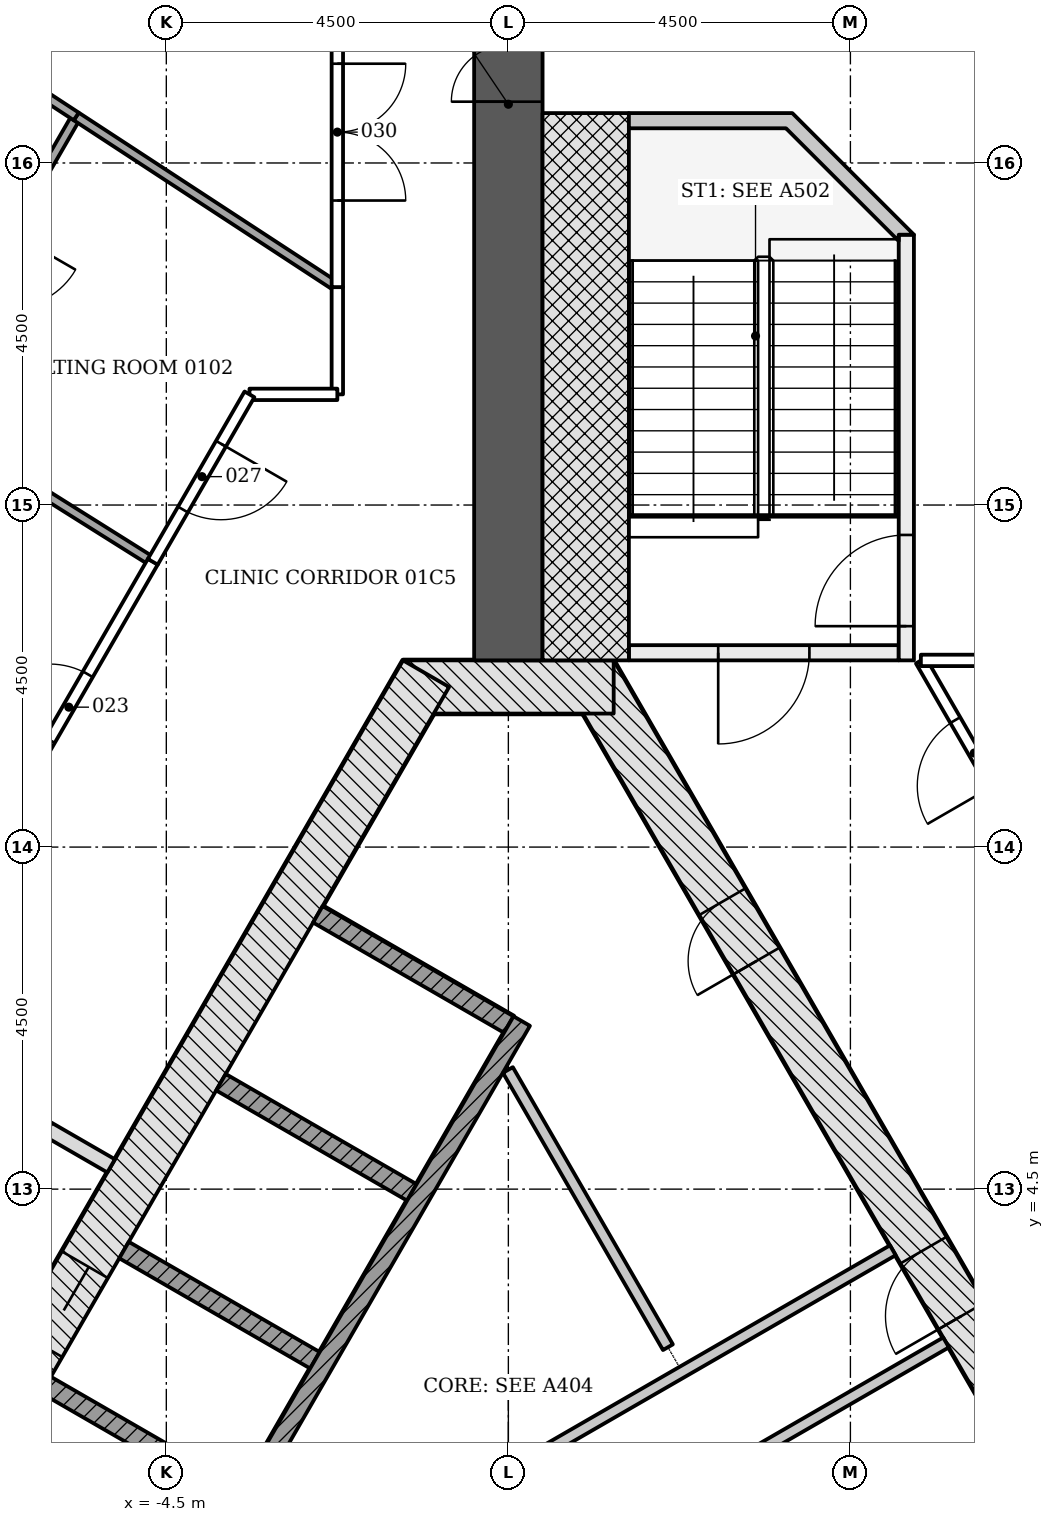
"""IFC4 building model, lengths in metres.
Left out: names, types, materials, properties, quantities, classifications, styles, units other than length and angle.
Written with IfcOpenShell. Run it as: python <this file> out.ifc"""

import sys

from ifc_helpers import new_model, si_unit, direction, frame, frame_2d, origin, place, context, subcontext, project, spatial, polyline, rectangle, outline, extrude, element, fill, save


model = new_model("IFC4")
c1 = context("Model", 3, precision=1e-05, world=origin(), true_north=direction((0.0, 1.0)))
c2 = subcontext(c1, "Body", "Model", "MODEL_VIEW")
j1 = project(units=[si_unit("LENGTHUNIT", "METRE"), si_unit("PLANEANGLEUNIT", "RADIAN")], contexts=[c1])
p1 = place(None, origin())
s1 = spatial("IfcSite", under=j1, at=p1, CompositionType="ELEMENT")
p2 = place(p1, origin())
s2 = spatial("IfcBuilding", under=s1, at=p2, CompositionType="ELEMENT")
p3 = place(p2, frame((0.0, 0.0, 6.0)))
s3 = spatial("IfcBuildingStorey", under=s2, at=p3, CompositionType="ELEMENT", Elevation=6.0)
p4 = place(p3, frame((10.311, -4.703, -0.25), z_axis=(0.0, 0.0, 1.0), x_axis=(-0.500001446645, 0.866024568562, 0.0)))
e1 = element("IfcWall", 1, at=p4, inside=s3, PredefinedType="SHEAR", context=c2, shape_type="SweptSolid", body=[
    extrude(rectangle(XDim=18.458, YDim=0.7, at=frame_2d((9.229, 0.0))), origin(), (0.0, 0.0, 1.0), 4.5),
])
p5 = place(p4, frame((8.7, 0.0, 0.25)))
e2 = element("IfcOpeningElement", 2, at=p5, cuts=e1, PredefinedType="OPENING", context=c2, shape_type="SweptSolid", body=[
    extrude(rectangle(XDim=1.0, YDim=2.1, at=frame_2d((0.5, 1.05))), frame((0.0, 0.36, 0.0), z_axis=(0.0, -1.0, 0.0), x_axis=(1.0, 0.0, 0.0)), (0.0, 0.0, 1.0), 0.72),
])
p6 = place(p4, frame((4.002, 0.0, 0.25)))
e3 = element("IfcOpeningElement", 3, at=p6, cuts=e1, PredefinedType="OPENING", context=c2, shape_type="SweptSolid", body=[
    extrude(rectangle(XDim=0.9, YDim=2.1, at=frame_2d((0.45, 1.05))), frame((0.0, 0.36, 0.0), z_axis=(0.0, -1.0, 0.0), x_axis=(1.0, 0.0, 0.0)), (0.0, 0.0, 1.0), 0.72),
])
p7 = place(p4, frame((14.093, 0.0, 0.25)))
e4 = element("IfcOpeningElement", 4, at=p7, cuts=e1, PredefinedType="OPENING", context=c2, shape_type="SweptSolid", body=[
    extrude(rectangle(XDim=0.9, YDim=2.1, at=frame_2d((0.45, 1.05))), frame((0.0, 0.36, 0.0), z_axis=(0.0, -1.0, 0.0), x_axis=(1.0, 0.0, 0.0)), (0.0, 0.0, 1.0), 0.72),
])
p8 = place(p3, frame((1.386, 11.106, -0.25), z_axis=(0.0, 0.0, 1.0), x_axis=(-1.0, 0.0, 0.0)))
e5 = element("IfcWall", 5, at=p8, inside=s3, PredefinedType="SHEAR", context=c2, shape_type="SweptSolid", body=[
    extrude(rectangle(XDim=2.771, YDim=0.7, at=frame_2d((1.386, 0.0))), origin(), (0.0, 0.0, 1.0), 4.5),
])
p9 = place(p3, frame((-1.083, 11.281, -0.25), z_axis=(0.0, 0.0, 1.0), x_axis=(-0.500001446645, -0.866024568562, 0.0)))
e6 = element("IfcWall", 6, at=p9, inside=s3, PredefinedType="SHEAR", context=c2, shape_type="SweptSolid", body=[
    extrude(rectangle(XDim=18.458, YDim=0.7, at=frame_2d((9.229, 0.0))), origin(), (0.0, 0.0, 1.0), 4.5),
])
p10 = place(p9, frame((8.979, 0.0, 0.25)))
e7 = element("IfcOpeningElement", 7, at=p10, cuts=e6, PredefinedType="OPENING", context=c2, shape_type="SweptSolid", body=[
    extrude(rectangle(XDim=1.2, YDim=2.1, at=frame_2d((0.6, 1.05))), frame((0.0, 0.36, 0.0), z_axis=(0.0, -1.0, 0.0), x_axis=(1.0, 0.0, 0.0)), (0.0, 0.0, 1.0), 0.72),
])
p11 = place(p9, frame((11.029, 0.0, 0.25)))
e8 = element("IfcOpeningElement", 8, at=p11, cuts=e6, PredefinedType="OPENING", context=c2, shape_type="SweptSolid", body=[
    extrude(rectangle(XDim=1.2, YDim=2.1, at=frame_2d((0.6, 1.05))), frame((0.0, 0.36, 0.0), z_axis=(0.0, -1.0, 0.0), x_axis=(1.0, 0.0, 0.0)), (0.0, 0.0, 1.0), 0.72),
])
p12 = place(p3, frame((0.0, 11.456, -0.25), z_axis=(0.0, 0.0, 1.0), x_axis=(0.0, 1.0, 0.0)))
e9 = element("IfcWall", 9, at=p12, inside=s3, PredefinedType="SHEAR", context=c2, shape_type="SweptSolid", body=[
    extrude(rectangle(XDim=14.633, YDim=0.9, at=frame_2d((7.316, 0.0))), origin(), (0.0, 0.0, 1.0), 4.5),
])
p13 = place(p12, frame((7.35, 0.0, 0.25)))
e10 = element("IfcOpeningElement", 10, at=p13, cuts=e9, PredefinedType="OPENING", context=c2, shape_type="SweptSolid", body=[
    extrude(rectangle(XDim=1.5, YDim=2.1, at=frame_2d((0.75, 1.05))), frame((0.0, 0.46, 0.0), z_axis=(0.0, -1.0, 0.0), x_axis=(1.0, 0.0, 0.0)), (0.0, 0.0, 1.0), 0.92),
])
p14 = place(p3, frame((-2.506, 8.115, -0.25), z_axis=(0.0, 0.0, 1.0), x_axis=(0.865996321171, -0.50005036918, 0.0)))
e11 = element("IfcWall", 11, at=p14, inside=s3, PredefinedType="PARTITIONING", context=c2, shape_type="SweptSolid", body=[
    extrude(rectangle(XDim=2.9, YDim=0.25, at=frame_2d((1.45, 0.0))), origin(), (0.0, 0.0, 1.0), 4.5),
])
for number, where, z_axis, x_axis in (
    (12, (-3.781, 5.907, -0.25), (0.0, 0.0, 1.0), (0.866, -0.5, 0.0)),
    (13, (-5.056, 3.699, -0.25), (0.0, 0.0, 1.0), (0.866, -0.5, 0.0)),
    (14, (-6.081, 1.923, -0.25), (0.0, 0.0, 1.0), (0.866, -0.5, 0.0)),
):
    element("IfcWall", number, at=place(p3, frame(where, z_axis=z_axis, x_axis=x_axis)), inside=s3, PredefinedType="PARTITIONING", context=c2, shape_type="SweptSolid", body=[
        extrude(rectangle(XDim=2.9, YDim=0.25, at=frame_2d((1.45, 0.0))), origin(), (0.0, 0.0, 1.0), 4.5),
    ])
p15 = place(p3, frame((0.176, 6.711, 0.0), z_axis=(0.0, 0.0, 1.0), x_axis=(-0.500004227369, -0.866022963098, 0.0)))
e15 = element("IfcWall", 15, at=p15, inside=s3, PredefinedType="PARTITIONING", context=c2, shape_type="SweptSolid", body=[
    extrude(rectangle(XDim=11.8, YDim=0.25, at=frame_2d((5.9, 0.0))), origin(), (0.0, 0.0, 1.0), 4.25),
])
p16 = place(p3, frame((-4.548, -1.851, 0.0), z_axis=(0.0, 0.0, 1.0), x_axis=(0.866023939251, 0.500002536638, 0.0)))
e16 = element("IfcWall", 16, at=p16, inside=s3, PredefinedType="PARTITIONING", context=c2, shape_type="SweptSolid", body=[
    extrude(rectangle(XDim=11.092, YDim=0.15, at=frame_2d((5.546, 0.0))), origin(), (0.0, 0.0, 1.0), 4.25),
])
p17 = place(p16, frame((3.497, 0.0, 0.0)))
e17 = element("IfcOpeningElement", 17, at=p17, cuts=e16, PredefinedType="OPENING", context=c2, shape_type="SweptSolid", body=[
    extrude(rectangle(XDim=0.9, YDim=2.1, at=frame_2d((0.45, 1.05))), frame((0.0, 0.085, 0.0), z_axis=(0.0, -1.0, 0.0), x_axis=(1.0, 0.0, 0.0)), (0.0, 0.0, 1.0), 0.17),
])
p18 = place(p3, frame((2.099, 2.42, 0.0), z_axis=(0.0, 0.0, 1.0), x_axis=(-0.499998449073, 0.866026299211, 0.0)))
e18 = element("IfcWall", 18, at=p18, inside=s3, PredefinedType="PARTITIONING", context=c2, shape_type="SweptSolid", body=[
    extrude(rectangle(XDim=4.211, YDim=0.15, at=frame_2d((2.106, 0.0))), origin(), (0.0, 0.0, 1.0), 4.25),
])
p19 = place(p3, frame((-4.454, -3.413, 0.0), z_axis=(0.0, 0.0, 1.0), x_axis=(0.86603043987, 0.499991277142, 0.0)))
e19 = element("IfcWall", 19, at=p19, inside=s3, PredefinedType="PARTITIONING", context=c2, shape_type="SweptSolid", body=[
    extrude(rectangle(XDim=11.792, YDim=0.15, at=frame_2d((5.896, 0.0))), origin(), (0.0, 0.0, 1.0), 4.25),
])
p20 = place(p19, frame((3.847, 0.0, 0.0)))
e20 = element("IfcOpeningElement", 20, at=p20, cuts=e19, PredefinedType="OPENING", context=c2, shape_type="SweptSolid", body=[
    extrude(rectangle(XDim=0.9, YDim=2.1, at=frame_2d((0.45, 1.05))), frame((0.0, 0.085, 0.0), z_axis=(0.0, -1.0, 0.0), x_axis=(1.0, 0.0, 0.0)), (0.0, 0.0, 1.0), 0.17),
])
p21 = place(p3, frame((5.135, 11.556, -0.25), z_axis=(0.0, 0.0, 1.0), x_axis=(-1.0, 0.0, 0.0)))
e21 = element("IfcWall", 21, at=p21, inside=s3, PredefinedType="SHEAR", context=c2, shape_type="SweptSolid", body=[
    extrude(rectangle(XDim=3.55, YDim=0.2, at=frame_2d((1.775, 0.0))), origin(), (0.0, 0.0, 1.0), 4.5),
])
p22 = place(p21, frame((1.175, 0.0, 0.25)))
e22 = element("IfcOpeningElement", 22, at=p22, cuts=e21, PredefinedType="OPENING", context=c2, shape_type="SweptSolid", body=[
    extrude(rectangle(XDim=1.2, YDim=2.1, at=frame_2d((0.6, 1.05))), frame((0.0, 0.11, 0.0), z_axis=(0.0, -1.0, 0.0), x_axis=(1.0, 0.0, 0.0)), (0.0, 0.0, 1.0), 0.22),
])
p23 = place(p3, frame((5.236, 11.456, -0.25), z_axis=(0.0, 0.0, 1.0), x_axis=(0.0, 1.0, 0.0)))
e23 = element("IfcWall", 23, at=p23, inside=s3, PredefinedType="SHEAR", context=c2, shape_type="SweptSolid", body=[
    extrude(rectangle(XDim=5.6, YDim=0.2, at=frame_2d((2.8, 0.0))), origin(), (0.0, 0.0, 1.0), 4.5),
])
p24 = place(p23, frame((0.45, 0.0, 0.25)))
e24 = element("IfcOpeningElement", 24, at=p24, cuts=e23, PredefinedType="OPENING", context=c2, shape_type="SweptSolid", body=[
    extrude(rectangle(XDim=1.2, YDim=2.1, at=frame_2d((0.6, 1.05))), frame((0.0, 0.11, 0.0), z_axis=(0.0, -1.0, 0.0), x_axis=(1.0, 0.0, 0.0)), (0.0, 0.0, 1.0), 0.22),
])
p25 = place(p3, frame((1.018, 11.456, -0.25), z_axis=(0.0, 0.0, 1.0), x_axis=(0.0, 1.0, 0.0)))
e25 = element("IfcWall", 25, at=p25, inside=s3, PredefinedType="SHEAR", context=c2, shape_type="SweptSolid", body=[
    extrude(rectangle(XDim=7.2, YDim=1.136, at=frame_2d((3.6, 0.0))), origin(), (0.0, 0.0, 1.0), 4.5),
])
p26 = place(p3, frame((0.0, 0.0, -0.25)))
e26 = element("IfcWall", 26, at=p26, inside=s3, PredefinedType="SHEAR", context=c2, shape_type="SweptSolid", body=[
    extrude(outline(polyline([(5.336, 17.056), (3.736, 18.656), (1.586, 18.656), (1.586, 18.456), (3.653, 18.456), (5.135, 16.974), (5.135, 17.056), (5.135, 17.056), (5.135, 17.056), (5.135, 17.056), (5.135, 17.056), (5.135, 17.056), (5.135, 17.056), (5.135, 17.056), (5.135, 17.056), (5.135, 17.056), (5.135, 17.056), (5.135, 17.056), (5.135, 17.056), (5.135, 17.056), (5.135, 17.056), (5.135, 17.056), (5.135, 17.056), (5.336, 17.056)])), origin(), (0.0, 0.0, 1.0), 4.5),
])
p27 = place(p3, frame((-5.226, 4.806, 0.0), z_axis=(0.0, 0.0, 1.0), x_axis=(-0.865949687125, 0.500131122175, 0.0)))
e27 = element("IfcWall", 27, at=p27, inside=s3, PredefinedType="PARTITIONING", context=c2, shape_type="SweptSolid", body=[
    extrude(rectangle(XDim=3.499, YDim=0.2, at=frame_2d((1.75, 0.0))), origin(), (0.0, 0.0, 1.0), 4.25),
])
p28 = place(p27, frame((0.95, 0.0, 0.0)))
e28 = element("IfcOpeningElement", 28, at=p28, cuts=e27, PredefinedType="OPENING", context=c2, shape_type="SweptSolid", body=[
    extrude(rectangle(XDim=1.5, YDim=2.1, at=frame_2d((0.75, 1.05))), frame((0.0, 0.11, 0.0), z_axis=(0.0, -1.0, 0.0), x_axis=(1.0, 0.0, 0.0)), (0.0, 0.0, 1.0), 0.22),
])
p29 = place(p3, frame((6.855, 8.982, 0.0), z_axis=(0.0, 0.0, 1.0), x_axis=(-0.500176439337, 0.865923512519, 0.0)))
e29 = element("IfcWall", 29, at=p29, inside=s3, PredefinedType="PARTITIONING", context=c2, shape_type="SweptSolid", body=[
    extrude(rectangle(XDim=2.855, YDim=0.15, at=frame_2d((1.427, 0.0))), origin(), (0.0, 0.0, 1.0), 3.638),
])
p30 = place(p29, frame((0.95, 0.0, 0.0)))
e30 = element("IfcOpeningElement", 30, at=p30, cuts=e29, PredefinedType="OPENING", context=c2, shape_type="SweptSolid", body=[
    extrude(rectangle(XDim=1.0, YDim=2.1, at=frame_2d((0.5, 1.05))), frame((0.0, 0.085, 0.0), z_axis=(0.0, -1.0, 0.0), x_axis=(1.0, 0.0, 0.0)), (0.0, 0.0, 1.0), 0.17),
])
p31 = place(p3, frame((5.427, 11.456, 0.0), z_axis=(0.0, 0.0, 1.0), x_axis=(1.0, 0.0, 0.0)))
e31 = element("IfcWall", 31, at=p31, inside=s3, PredefinedType="PARTITIONING", context=c2, shape_type="SweptSolid", body=[
    extrude(rectangle(XDim=1.708, YDim=0.15, at=frame_2d((0.854, 0.0))), origin(), (0.0, 0.0, 1.0), 4.25),
])
p32 = place(p3, frame((-6.858, 8.979, 0.0), z_axis=(0.0, 0.0, 1.0), x_axis=(0.500105111742, 0.865964708986, 0.0)))
e32 = element("IfcWall", 32, at=p32, inside=s3, PredefinedType="PARTITIONING", context=c2, shape_type="SweptSolid", body=[
    extrude(rectangle(XDim=4.363, YDim=0.15, at=frame_2d((2.181, 0.0))), origin(), (0.0, 0.0, 1.0), 3.638),
])
p33 = place(p32, frame((1.65, 0.0, 0.0)))
e33 = element("IfcOpeningElement", 33, at=p33, cuts=e32, PredefinedType="OPENING", context=c2, shape_type="SweptSolid", body=[
    extrude(rectangle(XDim=1.0, YDim=2.1, at=frame_2d((0.5, 1.05))), frame((0.0, 0.085, 0.0), z_axis=(0.0, -1.0, 0.0), x_axis=(1.0, 0.0, 0.0)), (0.0, 0.0, 1.0), 0.17),
])
p34 = place(p3, frame((-4.68, 12.753, 0.0), z_axis=(0.0, 0.0, 1.0), x_axis=(-0.846844902979, 0.531839929206, 0.0)))
e34 = element("IfcWall", 34, at=p34, inside=s3, PredefinedType="PARTITIONING", context=c2, shape_type="SweptSolid", body=[
    extrude(rectangle(XDim=3.8, YDim=0.12, at=frame_2d((1.9, 0.0))), origin(), (0.0, 0.0, 1.0), 3.638),
])
p35 = place(p3, frame((-2.25, 16.366, 0.0), z_axis=(0.0, 0.0, 1.0), x_axis=(0.0, -1.0, 0.0)))
e35 = element("IfcWall", 35, at=p35, inside=s3, PredefinedType="PARTITIONING", context=c2, shape_type="SweptSolid", body=[
    extrude(rectangle(XDim=1.41, YDim=0.15, at=frame_2d((0.705, 0.0))), origin(), (0.0, 0.0, 1.0), 3.638),
])
p36 = place(p3, frame((-2.25, 14.956, 0.0), z_axis=(0.0, 0.0, 1.0), x_axis=(-1.0, 0.0, 0.0)))
e36 = element("IfcWall", 36, at=p36, inside=s3, PredefinedType="PARTITIONING", context=c2, shape_type="SweptSolid", body=[
    extrude(rectangle(XDim=1.156, YDim=0.15, at=frame_2d((0.578, 0.0))), origin(), (0.0, 0.0, 1.0), 4.25),
])
p37 = place(p3, frame((-3.406, 14.956, 0.0), z_axis=(0.0, 0.0, 1.0), x_axis=(-0.499999364504, -0.866025770688, 0.0)))
e37 = element("IfcWall", 37, at=p37, inside=s3, PredefinedType="PARTITIONING", context=c2, shape_type="SweptSolid", body=[
    extrude(rectangle(XDim=2.544, YDim=0.15, at=frame_2d((1.272, 0.0))), origin(), (0.0, 0.0, 1.0), 3.638),
])
p38 = place(p37, frame((0.75, 0.0, 0.0)))
e38 = element("IfcOpeningElement", 38, at=p38, cuts=e37, PredefinedType="OPENING", context=c2, shape_type="SweptSolid", body=[
    extrude(rectangle(XDim=1.0, YDim=2.1, at=frame_2d((0.5, 1.05))), frame((0.0, 0.085, 0.0), z_axis=(0.0, -1.0, 0.0), x_axis=(1.0, 0.0, 0.0)), (0.0, 0.0, 1.0), 0.17),
])
p39 = place(p3, frame((-2.25, 20.456, 0.0), z_axis=(0.0, 0.0, 1.0), x_axis=(0.0, -1.0, 0.0)))
e39 = element("IfcWall", 39, at=p39, inside=s3, PredefinedType="PARTITIONING", context=c2, shape_type="SweptSolid", body=[
    extrude(rectangle(XDim=4.089, YDim=0.15, at=frame_2d((2.044, 0.0))), origin(), (0.0, 0.0, 1.0), 3.638),
])
p40 = place(p39, frame((1.15, 0.0, 0.0)))
e40 = element("IfcOpeningElement", 40, at=p40, cuts=e39, PredefinedType="OPENING", context=c2, shape_type="SweptSolid", body=[
    extrude(rectangle(XDim=1.8, YDim=2.1, at=frame_2d((0.9, 1.05))), frame((0.0, 0.085, 0.0), z_axis=(0.0, -1.0, 0.0), x_axis=(1.0, 0.0, 0.0)), (0.0, 0.0, 1.0), 0.17),
])
p41 = place(p3, frame((-5.684, 18.611, 0.0), z_axis=(0.0, 0.0, 1.0), x_axis=(-0.500099413844, -0.865967999567, 0.0)))
e41 = element("IfcWall", 41, at=p41, inside=s3, PredefinedType="PARTITIONING", context=c2, shape_type="SweptSolid", body=[
    extrude(rectangle(XDim=4.429, YDim=0.12, at=frame_2d((2.214, 0.0))), origin(), (0.0, 0.0, 1.0), 3.638),
])
p42 = place(p41, frame((1.75, 0.0, 0.0)))
e42 = element("IfcOpeningElement", 42, at=p42, cuts=e41, PredefinedType="OPENING", context=c2, shape_type="SweptSolid", body=[
    extrude(rectangle(XDim=1.0, YDim=2.1, at=frame_2d((0.5, 1.05))), frame((0.0, 0.07, 0.0), z_axis=(0.0, -1.0, 0.0), x_axis=(1.0, 0.0, 0.0)), (0.0, 0.0, 1.0), 0.14),
])
p43 = place(p3, frame((-2.252, 16.367, 0.0), z_axis=(0.0, 0.0, 1.0), x_axis=(-0.836925574982, 0.547316710819, 0.0)))
e43 = element("IfcWall", 43, at=p43, inside=s3, PredefinedType="PARTITIONING", context=c2, shape_type="SweptSolid", body=[
    extrude(rectangle(XDim=4.102, YDim=0.12, at=frame_2d((2.051, 0.0))), origin(), (0.0, 0.0, 1.0), 3.638),
])
p44 = place(p3, frame((-5.685, 18.612, 0.0), z_axis=(0.0, 0.0, 1.0), x_axis=(-0.836813840242, 0.547487531163, 0.0)))
e44 = element("IfcWall", 44, at=p44, inside=s3, PredefinedType="PARTITIONING", context=c2, shape_type="SweptSolid", body=[
    extrude(rectangle(XDim=2.734, YDim=0.12, at=frame_2d((1.367, 0.0))), origin(), (0.0, 0.0, 1.0), 3.638),
])
p45 = place(p10, origin())
e45 = element("IfcDoor", 45, at=p45, inside=s3, OperationType="DOUBLE_DOOR_SLIDING", PredefinedType="DOOR", context=c2, shape_type="SweptSolid", body=[
    extrude(rectangle(XDim=1.2, YDim=2.1, at=frame_2d((0.6, 1.05))), frame((0.0, 0.025, 0.0), z_axis=(0.0, -1.0, 0.0), x_axis=(1.0, 0.0, 0.0)), (0.0, 0.0, 1.0), 0.05),
])
fill(e7, e45)
p46 = place(p5, origin())
e46 = element("IfcDoor", 46, at=p46, inside=s3, OperationType="SINGLE_SWING_LEFT", PredefinedType="DOOR", context=c2, shape_type="SweptSolid", body=[
    extrude(rectangle(XDim=1.0, YDim=2.1, at=frame_2d((0.5, 1.05))), frame((0.0, 0.075, 0.0), z_axis=(0.0, -1.0, 0.0), x_axis=(1.0, 0.0, 0.0)), (0.0, 0.0, 1.0), 0.15),
])
fill(e2, e46)
p47 = place(p7, origin())
e47 = element("IfcDoor", 47, at=p47, inside=s3, OperationType="SINGLE_SWING_LEFT", PredefinedType="DOOR", context=c2, shape_type="SweptSolid", body=[
    extrude(rectangle(XDim=0.9, YDim=2.1, at=frame_2d((0.45, 1.05))), frame((0.0, 0.075, 0.0), z_axis=(0.0, -1.0, 0.0), x_axis=(1.0, 0.0, 0.0)), (0.0, 0.0, 1.0), 0.15),
])
fill(e4, e47)
p48 = place(p22, origin())
e48 = element("IfcDoor", 48, at=p48, inside=s3, OperationType="SINGLE_SWING_RIGHT", PredefinedType="DOOR", context=c2, shape_type="SweptSolid", body=[
    extrude(rectangle(XDim=1.2, YDim=2.1, at=frame_2d((0.6, 1.05))), frame((0.0, 0.025, 0.0), z_axis=(0.0, -1.0, 0.0), x_axis=(1.0, 0.0, 0.0)), (0.0, 0.0, 1.0), 0.05),
])
fill(e22, e48)
p49 = place(p24, origin())
e49 = element("IfcDoor", 49, at=p49, inside=s3, OperationType="SINGLE_SWING_LEFT", PredefinedType="DOOR", context=c2, shape_type="SweptSolid", body=[
    extrude(rectangle(XDim=1.2, YDim=2.1, at=frame_2d((0.6, 1.05))), frame((0.0, 0.025, 0.0), z_axis=(0.0, -1.0, 0.0), x_axis=(1.0, 0.0, 0.0)), (0.0, 0.0, 1.0), 0.05),
])
fill(e24, e49)
p50 = place(p33, origin())
e50 = element("IfcDoor", 50, at=p50, inside=s3, OperationType="SINGLE_SWING_LEFT", PredefinedType="DOOR", context=c2, shape_type="SweptSolid", body=[
    extrude(rectangle(XDim=1.0, YDim=2.1, at=frame_2d((0.5, 1.05))), frame((0.0, 0.025, 0.0), z_axis=(0.0, -1.0, 0.0), x_axis=(1.0, 0.0, 0.0)), (0.0, 0.0, 1.0), 0.05),
])
fill(e33, e50)
p51 = place(p30, origin())
e51 = element("IfcDoor", 51, at=p51, inside=s3, OperationType="SINGLE_SWING_LEFT", PredefinedType="DOOR", context=c2, shape_type="SweptSolid", body=[
    extrude(rectangle(XDim=1.0, YDim=2.1, at=frame_2d((0.5, 1.05))), frame((0.0, 0.025, 0.0), z_axis=(0.0, -1.0, 0.0), x_axis=(1.0, 0.0, 0.0)), (0.0, 0.0, 1.0), 0.05),
])
fill(e30, e51)
p52 = place(p38, origin())
e52 = element("IfcDoor", 52, at=p52, inside=s3, OperationType="SINGLE_SWING_RIGHT", PredefinedType="DOOR", context=c2, shape_type="SweptSolid", body=[
    extrude(rectangle(XDim=1.0, YDim=2.1, at=frame_2d((0.5, 1.05))), frame((0.0, 0.025, 0.0), z_axis=(0.0, -1.0, 0.0), x_axis=(1.0, 0.0, 0.0)), (0.0, 0.0, 1.0), 0.05),
])
fill(e38, e52)
p53 = place(p40, origin())
e53 = element("IfcDoor", 53, at=p53, inside=s3, OperationType="DOUBLE_DOOR_SINGLE_SWING", PredefinedType="DOOR", context=c2, shape_type="SweptSolid", body=[
    extrude(rectangle(XDim=1.8, YDim=2.1, at=frame_2d((0.9, 1.05))), frame((0.0, 0.025, 0.0), z_axis=(0.0, -1.0, 0.0), x_axis=(1.0, 0.0, 0.0)), (0.0, 0.0, 1.0), 0.05),
])
fill(e40, e53)
p54 = place(p13, origin())
e54 = element("IfcDoor", 54, at=p54, inside=s3, OperationType="DOUBLE_DOOR_SINGLE_SWING", PredefinedType="DOOR", context=c2, shape_type="SweptSolid", body=[
    extrude(rectangle(XDim=1.5, YDim=2.1, at=frame_2d((0.75, 1.05))), frame((0.0, 0.025, 0.0), z_axis=(0.0, -1.0, 0.0), x_axis=(1.0, 0.0, 0.0)), (0.0, 0.0, 1.0), 0.05),
])
fill(e10, e54)
save(model, sys.argv[1])
